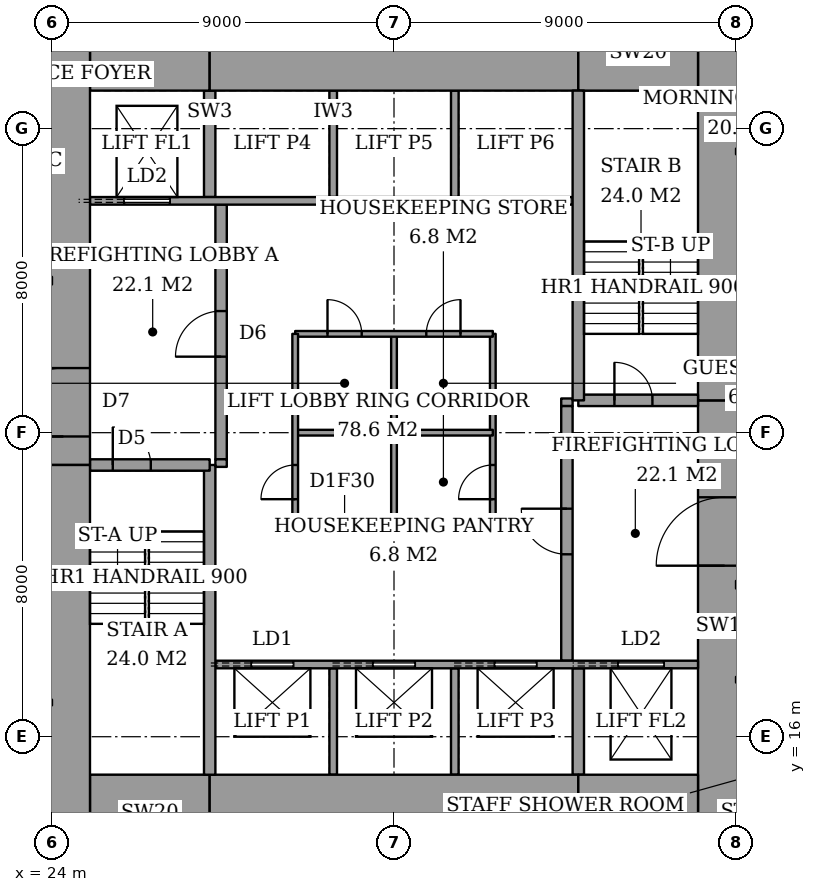
"""IFC4 building model, lengths in metres.
Left out: names, types, materials, properties, quantities, classifications, styles, units other than length and angle.
Written with IfcOpenShell. Run it as: python <this file> out.ifc"""

import sys

from ifc_helpers import new_model, si_unit, direction, frame, frame_2d, origin, place, context, subcontext, project, spatial, rectangle, extrude, element, fill, save


model = new_model("IFC4")
c1 = context("Model", 3, precision=1e-05, world=origin(), true_north=direction((0.0, 1.0)))
c2 = subcontext(c1, "Body", "Model", "MODEL_VIEW")
j1 = project(units=[si_unit("LENGTHUNIT", "METRE"), si_unit("PLANEANGLEUNIT", "RADIAN")], contexts=[c1])
p1 = place(None, origin())
s1 = spatial("IfcSite", under=j1, at=p1, CompositionType="ELEMENT")
p2 = place(p1, origin())
s2 = spatial("IfcBuilding", under=s1, at=p2, CompositionType="ELEMENT")
p3 = place(p2, frame((0.0, 0.0, 168.2)))
s3 = spatial("IfcBuildingStorey", under=s2, at=p3, CompositionType="ELEMENT", Elevation=168.2)
p4 = place(p3, frame((25.0, 14.0, 0.0), z_axis=(0.0, 0.0, 1.0), x_axis=(1.0, 0.0, 0.0)))
e1 = element("IfcWall", 1, at=p4, inside=s3, PredefinedType="SHEAR", context=c2, shape_type="SweptSolid", body=[
    extrude(rectangle(XDim=3.15, YDim=2.0, at=frame_2d((1.575, 0.0))), origin(), (0.0, 0.0, 1.0), 3.6),
])
p5 = place(p3, frame((28.15, 14.0, 0.0), z_axis=(0.0, 0.0, 1.0), x_axis=(1.0, 0.0, 0.0)))
e2 = element("IfcWall", 2, at=p5, inside=s3, PredefinedType="SHEAR", context=c2, shape_type="SweptSolid", body=[
    extrude(rectangle(XDim=9.7, YDim=2.0, at=frame_2d((4.85, 0.0))), origin(), (0.0, 0.0, 1.0), 3.6),
])
for number, where, z_axis, x_axis in (
    (3, (37.85, 14.0, 0.0), (0.0, 0.0, 1.0), (1.0, 0.0, 0.0)),
    (4, (25.0, 34.0, 0.0), (0.0, 0.0, 1.0), (1.0, 0.0, 0.0)),
):
    element("IfcWall", number, at=place(p3, frame(where, z_axis=z_axis, x_axis=x_axis)), inside=s3, PredefinedType="SHEAR", context=c2, shape_type="SweptSolid", body=[
        extrude(rectangle(XDim=3.15, YDim=2.0, at=frame_2d((1.575, 0.0))), origin(), (0.0, 0.0, 1.0), 3.6),
    ])
p6 = place(p3, frame((28.15, 34.0, 0.0), z_axis=(0.0, 0.0, 1.0), x_axis=(1.0, 0.0, 0.0)))
e5 = element("IfcWall", 5, at=p6, inside=s3, PredefinedType="SHEAR", context=c2, shape_type="SweptSolid", body=[
    extrude(rectangle(XDim=9.7, YDim=2.0, at=frame_2d((4.85, 0.0))), origin(), (0.0, 0.0, 1.0), 3.6),
])
p7 = place(p3, frame((37.85, 34.0, 0.0), z_axis=(0.0, 0.0, 1.0), x_axis=(1.0, 0.0, 0.0)))
e6 = element("IfcWall", 6, at=p7, inside=s3, PredefinedType="SHEAR", context=c2, shape_type="SweptSolid", body=[
    extrude(rectangle(XDim=3.15, YDim=2.0, at=frame_2d((1.575, 0.0))), origin(), (0.0, 0.0, 1.0), 3.6),
])
p8 = place(p3, frame((24.3, 13.0, 0.0), z_axis=(0.0, 0.0, 1.0), x_axis=(0.0, 1.0, 0.0)))
e7 = element("IfcWall", 7, at=p8, inside=s3, PredefinedType="SHEAR", context=c2, shape_type="SweptSolid", body=[
    extrude(rectangle(XDim=10.15, YDim=1.4, at=frame_2d((5.075, 0.0))), origin(), (0.0, 0.0, 1.0), 3.6),
])
p9 = place(p3, frame((24.3, 23.15, 0.0), z_axis=(0.0, 0.0, 1.0), x_axis=(0.0, 1.0, 0.0)))
e8 = element("IfcWall", 8, at=p9, inside=s3, PredefinedType="SHEAR", context=c2, shape_type="SweptSolid", body=[
    extrude(rectangle(XDim=11.85, YDim=1.4, at=frame_2d((5.925, 0.0))), origin(), (0.0, 0.0, 1.0), 3.6),
])
p10 = place(p9, frame((0.75, 0.0, 0.0)))
e9 = element("IfcOpeningElement", 9, at=p10, cuts=e8, PredefinedType="OPENING", context=c2, shape_type="SweptSolid", body=[
    extrude(rectangle(XDim=1.8, YDim=2.4, at=frame_2d((0.9, 1.2))), frame((0.0, 0.71, 0.0), z_axis=(0.0, -1.0, 0.0), x_axis=(1.0, 0.0, 0.0)), (0.0, 0.0, 1.0), 1.42),
])
p11 = place(p3, frame((41.7, 13.0, 0.0), z_axis=(0.0, 0.0, 1.0), x_axis=(0.0, 1.0, 0.0)))
e10 = element("IfcWall", 10, at=p11, inside=s3, PredefinedType="SHEAR", context=c2, shape_type="SweptSolid", body=[
    extrude(rectangle(XDim=11.85, YDim=1.4, at=frame_2d((5.925, 0.0))), origin(), (0.0, 0.0, 1.0), 3.6),
])
p12 = place(p11, frame((7.5, 0.0, 0.0)))
e11 = element("IfcOpeningElement", 11, at=p12, cuts=e10, PredefinedType="OPENING", context=c2, shape_type="SweptSolid", body=[
    extrude(rectangle(XDim=1.8, YDim=2.4, at=frame_2d((0.9, 1.2))), frame((0.0, 0.71, 0.0), z_axis=(0.0, -1.0, 0.0), x_axis=(1.0, 0.0, 0.0)), (0.0, 0.0, 1.0), 1.42),
])
p13 = place(p3, frame((41.7, 24.85, 0.0), z_axis=(0.0, 0.0, 1.0), x_axis=(0.0, 1.0, 0.0)))
e12 = element("IfcWall", 12, at=p13, inside=s3, PredefinedType="SHEAR", context=c2, shape_type="SweptSolid", body=[
    extrude(rectangle(XDim=10.15, YDim=1.4, at=frame_2d((5.075, 0.0))), origin(), (0.0, 0.0, 1.0), 3.6),
])
p14 = place(p3, frame((28.15, 15.0, 0.0), z_axis=(0.0, 0.0, 1.0), x_axis=(0.0, 1.0, 0.0)))
e13 = element("IfcWall", 13, at=p14, inside=s3, PredefinedType="SHEAR", context=c2, shape_type="SweptSolid", body=[
    extrude(rectangle(XDim=8.15, YDim=0.3, at=frame_2d((4.075, 0.0))), origin(), (0.0, 0.0, 1.0), 3.6),
])
p15 = place(p3, frame((25.0, 23.15, 0.0), z_axis=(0.0, 0.0, 1.0), x_axis=(1.0, 0.0, 0.0)))
e14 = element("IfcWall", 14, at=p15, inside=s3, PredefinedType="SHEAR", context=c2, shape_type="SweptSolid", body=[
    extrude(rectangle(XDim=3.15, YDim=0.3, at=frame_2d((1.575, 0.0))), origin(), (0.0, 0.0, 1.0), 3.6),
])
p16 = place(p15, frame((0.6, 0.0, 0.0)))
e15 = element("IfcOpeningElement", 15, at=p16, cuts=e14, PredefinedType="OPENING", context=c2, shape_type="SweptSolid", body=[
    extrude(rectangle(XDim=1.0, YDim=2.1, at=frame_2d((0.5, 1.05))), frame((0.0, 0.16, 0.0), z_axis=(0.0, -1.0, 0.0), x_axis=(1.0, 0.0, 0.0)), (0.0, 0.0, 1.0), 0.32),
])
p17 = place(p3, frame((37.85, 24.85, 0.0), z_axis=(0.0, 0.0, 1.0), x_axis=(0.0, 1.0, 0.0)))
e16 = element("IfcWall", 16, at=p17, inside=s3, PredefinedType="SHEAR", context=c2, shape_type="SweptSolid", body=[
    extrude(rectangle(XDim=8.15, YDim=0.3, at=frame_2d((4.075, 0.0))), origin(), (0.0, 0.0, 1.0), 3.6),
])
p18 = place(p3, frame((37.85, 24.85, 0.0), z_axis=(0.0, 0.0, 1.0), x_axis=(1.0, 0.0, 0.0)))
e17 = element("IfcWall", 17, at=p18, inside=s3, PredefinedType="SHEAR", context=c2, shape_type="SweptSolid", body=[
    extrude(rectangle(XDim=3.15, YDim=0.3, at=frame_2d((1.575, 0.0))), origin(), (0.0, 0.0, 1.0), 3.6),
])
p19 = place(p18, frame((0.95, 0.0, 0.0)))
e18 = element("IfcOpeningElement", 18, at=p19, cuts=e17, PredefinedType="OPENING", context=c2, shape_type="SweptSolid", body=[
    extrude(rectangle(XDim=1.0, YDim=2.1, at=frame_2d((0.5, 1.05))), frame((0.0, 0.16, 0.0), z_axis=(0.0, -1.0, 0.0), x_axis=(1.0, 0.0, 0.0)), (0.0, 0.0, 1.0), 0.32),
])
p20 = place(p3, frame((28.45, 23.3, 0.0), z_axis=(0.0, 0.0, 1.0), x_axis=(0.0, 1.0, 0.0)))
e19 = element("IfcWall", 19, at=p20, inside=s3, PredefinedType="PARTITIONING", context=c2, shape_type="SweptSolid", body=[
    extrude(rectangle(XDim=6.7, YDim=0.3, at=frame_2d((3.35, 0.0))), origin(), (0.0, 0.0, 1.0), 3.6),
])
p21 = place(p20, frame((2.7, 0.0, 0.0)))
e20 = element("IfcOpeningElement", 20, at=p21, cuts=e19, PredefinedType="OPENING", context=c2, shape_type="SweptSolid", body=[
    extrude(rectangle(XDim=1.2, YDim=2.1, at=frame_2d((0.6, 1.05))), frame((0.0, 0.16, 0.0), z_axis=(0.0, -1.0, 0.0), x_axis=(1.0, 0.0, 0.0)), (0.0, 0.0, 1.0), 0.32),
])
p22 = place(p3, frame((37.55, 18.0, 0.0), z_axis=(0.0, 0.0, 1.0), x_axis=(0.0, 1.0, 0.0)))
e21 = element("IfcWall", 21, at=p22, inside=s3, PredefinedType="PARTITIONING", context=c2, shape_type="SweptSolid", body=[
    extrude(rectangle(XDim=6.7, YDim=0.3, at=frame_2d((3.35, 0.0))), origin(), (0.0, 0.0, 1.0), 3.6),
])
p23 = place(p22, frame((2.8, 0.0, 0.0)))
e22 = element("IfcOpeningElement", 22, at=p23, cuts=e21, PredefinedType="OPENING", context=c2, shape_type="SweptSolid", body=[
    extrude(rectangle(XDim=1.2, YDim=2.1, at=frame_2d((0.6, 1.05))), frame((0.0, 0.16, 0.0), z_axis=(0.0, -1.0, 0.0), x_axis=(1.0, 0.0, 0.0)), (0.0, 0.0, 1.0), 0.32),
])
p24 = place(p3, frame((28.3, 17.9, 0.0), z_axis=(0.0, 0.0, 1.0), x_axis=(1.0, 0.0, 0.0)))
e23 = element("IfcWall", 23, at=p24, inside=s3, PredefinedType="PARTITIONING", context=c2, shape_type="SweptSolid", body=[
    extrude(rectangle(XDim=12.7, YDim=0.2, at=frame_2d((6.35, 0.0))), origin(), (0.0, 0.0, 1.0), 3.6),
])
p25 = place(p24, frame((0.95, 0.0, 0.0)))
e24 = element("IfcOpeningElement", 24, at=p25, cuts=e23, PredefinedType="OPENING", context=c2, shape_type="SweptSolid", body=[
    extrude(rectangle(XDim=1.1, YDim=2.1, at=frame_2d((0.55, 1.05))), frame((0.0, 0.11, 0.0), z_axis=(0.0, -1.0, 0.0), x_axis=(1.0, 0.0, 0.0)), (0.0, 0.0, 1.0), 0.22),
])
p26 = place(p24, frame((4.15, 0.0, 0.0)))
e25 = element("IfcOpeningElement", 25, at=p26, cuts=e23, PredefinedType="OPENING", context=c2, shape_type="SweptSolid", body=[
    extrude(rectangle(XDim=1.1, YDim=2.1, at=frame_2d((0.55, 1.05))), frame((0.0, 0.11, 0.0), z_axis=(0.0, -1.0, 0.0), x_axis=(1.0, 0.0, 0.0)), (0.0, 0.0, 1.0), 0.22),
])
p27 = place(p24, frame((7.35, 0.0, 0.0)))
e26 = element("IfcOpeningElement", 26, at=p27, cuts=e23, PredefinedType="OPENING", context=c2, shape_type="SweptSolid", body=[
    extrude(rectangle(XDim=1.1, YDim=2.1, at=frame_2d((0.55, 1.05))), frame((0.0, 0.11, 0.0), z_axis=(0.0, -1.0, 0.0), x_axis=(1.0, 0.0, 0.0)), (0.0, 0.0, 1.0), 0.22),
])
p28 = place(p24, frame((10.6, 0.0, 0.0)))
e27 = element("IfcOpeningElement", 27, at=p28, cuts=e23, PredefinedType="OPENING", context=c2, shape_type="SweptSolid", body=[
    extrude(rectangle(XDim=1.2, YDim=2.1, at=frame_2d((0.6, 1.05))), frame((0.0, 0.11, 0.0), z_axis=(0.0, -1.0, 0.0), x_axis=(1.0, 0.0, 0.0)), (0.0, 0.0, 1.0), 0.22),
])
p29 = place(p3, frame((25.0, 30.1, 0.0), z_axis=(0.0, 0.0, 1.0), x_axis=(1.0, 0.0, 0.0)))
e28 = element("IfcWall", 28, at=p29, inside=s3, PredefinedType="PARTITIONING", context=c2, shape_type="SweptSolid", body=[
    extrude(rectangle(XDim=12.7, YDim=0.2, at=frame_2d((6.35, 0.0))), origin(), (0.0, 0.0, 1.0), 3.6),
])
p30 = place(p29, frame((0.9, 0.0, 0.0)))
e29 = element("IfcOpeningElement", 29, at=p30, cuts=e28, PredefinedType="OPENING", context=c2, shape_type="SweptSolid", body=[
    extrude(rectangle(XDim=1.2, YDim=2.1, at=frame_2d((0.6, 1.05))), frame((0.0, 0.11, 0.0), z_axis=(0.0, -1.0, 0.0), x_axis=(1.0, 0.0, 0.0)), (0.0, 0.0, 1.0), 0.22),
])
for number, where, z_axis, x_axis in (
    (30, (31.4, 15.0, 0.0), (0.0, 0.0, 1.0), (0.0, 1.0, 0.0)),
    (31, (34.6, 15.0, 0.0), (0.0, 0.0, 1.0), (0.0, 1.0, 0.0)),
):
    element("IfcWall", number, at=place(p3, frame(where, z_axis=z_axis, x_axis=x_axis)), inside=s3, PredefinedType="PARTITIONING", context=c2, shape_type="SweptSolid", body=[
        extrude(rectangle(XDim=2.8, YDim=0.2, at=frame_2d((1.4, 0.0))), origin(), (0.0, 0.0, 1.0), 3.6),
    ])
p31 = place(p3, frame((37.85, 15.0, 0.0), z_axis=(0.0, 0.0, 1.0), x_axis=(0.0, 1.0, 0.0)))
e32 = element("IfcWall", 32, at=p31, inside=s3, PredefinedType="SHEAR", context=c2, shape_type="SweptSolid", body=[
    extrude(rectangle(XDim=2.8, YDim=0.3, at=frame_2d((1.4, 0.0))), origin(), (0.0, 0.0, 1.0), 3.6),
])
for number, where, z_axis, x_axis in (
    (33, (31.4, 30.2, 0.0), (0.0, 0.0, 1.0), (0.0, 1.0, 0.0)),
    (34, (34.6, 30.2, 0.0), (0.0, 0.0, 1.0), (0.0, 1.0, 0.0)),
):
    element("IfcWall", number, at=place(p3, frame(where, z_axis=z_axis, x_axis=x_axis)), inside=s3, PredefinedType="PARTITIONING", context=c2, shape_type="SweptSolid", body=[
        extrude(rectangle(XDim=2.8, YDim=0.2, at=frame_2d((1.4, 0.0))), origin(), (0.0, 0.0, 1.0), 3.6),
    ])
p32 = place(p3, frame((28.15, 30.2, 0.0), z_axis=(0.0, 0.0, 1.0), x_axis=(0.0, 1.0, 0.0)))
e35 = element("IfcWall", 35, at=p32, inside=s3, PredefinedType="SHEAR", context=c2, shape_type="SweptSolid", body=[
    extrude(rectangle(XDim=2.8, YDim=0.3, at=frame_2d((1.4, 0.0))), origin(), (0.0, 0.0, 1.0), 3.6),
])
for number, where, z_axis, x_axis in (
    (36, (28.3, 23.2, 0.0), (0.0, 0.0, 1.0), (1.0, 0.0, 0.0)),
    (37, (37.4, 24.8, 0.0), (0.0, 0.0, 1.0), (1.0, 0.0, 0.0)),
):
    element("IfcWall", number, at=place(p3, frame(where, z_axis=z_axis, x_axis=x_axis)), inside=s3, PredefinedType="PARTITIONING", context=c2, shape_type="SweptSolid", body=[
        extrude(rectangle(XDim=0.3, YDim=0.2, at=frame_2d((0.15, 0.0))), origin(), (0.0, 0.0, 1.0), 3.6),
    ])
p33 = place(p3, frame((30.4, 21.4, 0.0), z_axis=(0.0, 0.0, 1.0), x_axis=(1.0, 0.0, 0.0)))
e38 = element("IfcWall", 38, at=p33, inside=s3, PredefinedType="PARTITIONING", context=c2, shape_type="SweptSolid", body=[
    extrude(rectangle(XDim=5.2, YDim=0.15, at=frame_2d((2.6, 0.0))), origin(), (0.0, 0.0, 1.0), 3.25),
])
p34 = place(p3, frame((30.4, 26.6, 0.0), z_axis=(0.0, 0.0, 1.0), x_axis=(1.0, 0.0, 0.0)))
e39 = element("IfcWall", 39, at=p34, inside=s3, PredefinedType="PARTITIONING", context=c2, shape_type="SweptSolid", body=[
    extrude(rectangle(XDim=5.2, YDim=0.15, at=frame_2d((2.6, 0.0))), origin(), (0.0, 0.0, 1.0), 3.25),
])
p35 = place(p34, frame((0.85, 0.0, 0.0)))
e40 = element("IfcOpeningElement", 40, at=p35, cuts=e39, PredefinedType="OPENING", context=c2, shape_type="SweptSolid", body=[
    extrude(rectangle(XDim=0.9, YDim=2.1, at=frame_2d((0.45, 1.05))), frame((0.0, 0.085, 0.0), z_axis=(0.0, -1.0, 0.0), x_axis=(1.0, 0.0, 0.0)), (0.0, 0.0, 1.0), 0.17),
])
p36 = place(p34, frame((3.45, 0.0, 0.0)))
e41 = element("IfcOpeningElement", 41, at=p36, cuts=e39, PredefinedType="OPENING", context=c2, shape_type="SweptSolid", body=[
    extrude(rectangle(XDim=0.9, YDim=2.1, at=frame_2d((0.45, 1.05))), frame((0.0, 0.085, 0.0), z_axis=(0.0, -1.0, 0.0), x_axis=(1.0, 0.0, 0.0)), (0.0, 0.0, 1.0), 0.17),
])
p37 = place(p3, frame((30.4, 21.4, 0.0), z_axis=(0.0, 0.0, 1.0), x_axis=(0.0, 1.0, 0.0)))
e42 = element("IfcWall", 42, at=p37, inside=s3, PredefinedType="PARTITIONING", context=c2, shape_type="SweptSolid", body=[
    extrude(rectangle(XDim=5.2, YDim=0.15, at=frame_2d((2.6, 0.0))), origin(), (0.0, 0.0, 1.0), 3.25),
])
p38 = place(p37, frame((0.85, 0.0, 0.0)))
e43 = element("IfcOpeningElement", 43, at=p38, cuts=e42, PredefinedType="OPENING", context=c2, shape_type="SweptSolid", body=[
    extrude(rectangle(XDim=0.9, YDim=2.1, at=frame_2d((0.45, 1.05))), frame((0.0, 0.085, 0.0), z_axis=(0.0, -1.0, 0.0), x_axis=(1.0, 0.0, 0.0)), (0.0, 0.0, 1.0), 0.17),
])
p39 = place(p3, frame((35.6, 21.4, 0.0), z_axis=(0.0, 0.0, 1.0), x_axis=(0.0, 1.0, 0.0)))
e44 = element("IfcWall", 44, at=p39, inside=s3, PredefinedType="PARTITIONING", context=c2, shape_type="SweptSolid", body=[
    extrude(rectangle(XDim=5.2, YDim=0.15, at=frame_2d((2.6, 0.0))), origin(), (0.0, 0.0, 1.0), 3.25),
])
p40 = place(p39, frame((0.85, 0.0, 0.0)))
e45 = element("IfcOpeningElement", 45, at=p40, cuts=e44, PredefinedType="OPENING", context=c2, shape_type="SweptSolid", body=[
    extrude(rectangle(XDim=0.9, YDim=2.1, at=frame_2d((0.45, 1.05))), frame((0.0, 0.085, 0.0), z_axis=(0.0, -1.0, 0.0), x_axis=(1.0, 0.0, 0.0)), (0.0, 0.0, 1.0), 0.17),
])
for number, where, z_axis, x_axis in (
    (46, (30.4, 24.0, 0.0), (0.0, 0.0, 1.0), (1.0, 0.0, 0.0)),
    (47, (33.0, 21.4, 0.0), (0.0, 0.0, 1.0), (0.0, 1.0, 0.0)),
):
    element("IfcWall", number, at=place(p3, frame(where, z_axis=z_axis, x_axis=x_axis)), inside=s3, PredefinedType="PARTITIONING", context=c2, shape_type="SweptSolid", body=[
        extrude(rectangle(XDim=5.2, YDim=0.15, at=frame_2d((2.6, 0.0))), origin(), (0.0, 0.0, 1.0), 3.25),
    ])
p41 = place(p16, origin())
e48 = element("IfcDoor", 48, at=p41, inside=s3, OperationType="SINGLE_SWING_RIGHT", PredefinedType="DOOR", context=c2, shape_type="SweptSolid", body=[
    extrude(rectangle(XDim=1.0, YDim=2.1, at=frame_2d((0.5, 1.05))), frame((0.0, 0.025, 0.0), z_axis=(0.0, -1.0, 0.0), x_axis=(1.0, 0.0, 0.0)), (0.0, 0.0, 1.0), 0.05),
])
fill(e15, e48)
p42 = place(p19, origin())
e49 = element("IfcDoor", 49, at=p42, inside=s3, OperationType="SINGLE_SWING_RIGHT", PredefinedType="DOOR", context=c2, shape_type="SweptSolid", body=[
    extrude(rectangle(XDim=1.0, YDim=2.1, at=frame_2d((0.5, 1.05))), frame((0.0, 0.025, 0.0), z_axis=(0.0, -1.0, 0.0), x_axis=(1.0, 0.0, 0.0)), (0.0, 0.0, 1.0), 0.05),
])
fill(e18, e49)
p43 = place(p21, origin())
e50 = element("IfcDoor", 50, at=p43, inside=s3, OperationType="SINGLE_SWING_RIGHT", PredefinedType="DOOR", context=c2, shape_type="SweptSolid", body=[
    extrude(rectangle(XDim=1.2, YDim=2.1, at=frame_2d((0.6, 1.05))), frame((0.0, 0.025, 0.0), z_axis=(0.0, -1.0, 0.0), x_axis=(1.0, 0.0, 0.0)), (0.0, 0.0, 1.0), 0.05),
])
fill(e20, e50)
p44 = place(p23, origin())
e51 = element("IfcDoor", 51, at=p44, inside=s3, OperationType="SINGLE_SWING_LEFT", PredefinedType="DOOR", context=c2, shape_type="SweptSolid", body=[
    extrude(rectangle(XDim=1.2, YDim=2.1, at=frame_2d((0.6, 1.05))), frame((0.0, 0.025, 0.0), z_axis=(0.0, -1.0, 0.0), x_axis=(1.0, 0.0, 0.0)), (0.0, 0.0, 1.0), 0.05),
])
fill(e22, e51)
p45 = place(p10, origin())
e52 = element("IfcDoor", 52, at=p45, inside=s3, OperationType="DOUBLE_DOOR_DOUBLE_SWING", PredefinedType="DOOR", context=c2, shape_type="SweptSolid", body=[
    extrude(rectangle(XDim=1.8, YDim=2.4, at=frame_2d((0.9, 1.2))), frame((0.0, 0.025, 0.0), z_axis=(0.0, -1.0, 0.0), x_axis=(1.0, 0.0, 0.0)), (0.0, 0.0, 1.0), 0.05),
])
fill(e9, e52)
p46 = place(p12, origin())
e53 = element("IfcDoor", 53, at=p46, inside=s3, OperationType="DOUBLE_DOOR_DOUBLE_SWING", PredefinedType="DOOR", context=c2, shape_type="SweptSolid", body=[
    extrude(rectangle(XDim=1.8, YDim=2.4, at=frame_2d((0.9, 1.2))), frame((0.0, 0.025, 0.0), z_axis=(0.0, -1.0, 0.0), x_axis=(1.0, 0.0, 0.0)), (0.0, 0.0, 1.0), 0.05),
])
fill(e11, e53)
p47 = place(p38, origin())
e54 = element("IfcDoor", 54, at=p47, inside=s3, OperationType="SINGLE_SWING_RIGHT", PredefinedType="DOOR", context=c2, shape_type="SweptSolid", body=[
    extrude(rectangle(XDim=0.9, YDim=2.1, at=frame_2d((0.45, 1.05))), frame((0.0, 0.025, 0.0), z_axis=(0.0, -1.0, 0.0), x_axis=(1.0, 0.0, 0.0)), (0.0, 0.0, 1.0), 0.05),
])
fill(e43, e54)
p48 = place(p40, origin())
e55 = element("IfcDoor", 55, at=p48, inside=s3, OperationType="SINGLE_SWING_RIGHT", PredefinedType="DOOR", context=c2, shape_type="SweptSolid", body=[
    extrude(rectangle(XDim=0.9, YDim=2.1, at=frame_2d((0.45, 1.05))), frame((0.0, 0.025, 0.0), z_axis=(0.0, -1.0, 0.0), x_axis=(1.0, 0.0, 0.0)), (0.0, 0.0, 1.0), 0.05),
])
fill(e45, e55)
p49 = place(p35, origin())
e56 = element("IfcDoor", 56, at=p49, inside=s3, OperationType="SINGLE_SWING_RIGHT", PredefinedType="DOOR", context=c2, shape_type="SweptSolid", body=[
    extrude(rectangle(XDim=0.9, YDim=2.1, at=frame_2d((0.45, 1.05))), frame((0.0, 0.025, 0.0), z_axis=(0.0, -1.0, 0.0), x_axis=(1.0, 0.0, 0.0)), (0.0, 0.0, 1.0), 0.05),
])
fill(e40, e56)
p50 = place(p36, origin())
e57 = element("IfcDoor", 57, at=p50, inside=s3, OperationType="SINGLE_SWING_LEFT", PredefinedType="DOOR", context=c2, shape_type="SweptSolid", body=[
    extrude(rectangle(XDim=0.9, YDim=2.1, at=frame_2d((0.45, 1.05))), frame((0.0, 0.025, 0.0), z_axis=(0.0, -1.0, 0.0), x_axis=(1.0, 0.0, 0.0)), (0.0, 0.0, 1.0), 0.05),
])
fill(e41, e57)
p51 = place(p25, origin())
e58 = element("IfcDoor", 58, at=p51, inside=s3, OperationType="SLIDING_TO_LEFT", PredefinedType="DOOR", context=c2, shape_type="SweptSolid", body=[
    extrude(rectangle(XDim=1.1, YDim=2.1, at=frame_2d((0.55, 1.05))), frame((0.0, 0.025, 0.0), z_axis=(0.0, -1.0, 0.0), x_axis=(1.0, 0.0, 0.0)), (0.0, 0.0, 1.0), 0.05),
])
fill(e24, e58)
p52 = place(p26, origin())
e59 = element("IfcDoor", 59, at=p52, inside=s3, OperationType="SLIDING_TO_LEFT", PredefinedType="DOOR", context=c2, shape_type="SweptSolid", body=[
    extrude(rectangle(XDim=1.1, YDim=2.1, at=frame_2d((0.55, 1.05))), frame((0.0, 0.025, 0.0), z_axis=(0.0, -1.0, 0.0), x_axis=(1.0, 0.0, 0.0)), (0.0, 0.0, 1.0), 0.05),
])
fill(e25, e59)
p53 = place(p27, origin())
e60 = element("IfcDoor", 60, at=p53, inside=s3, OperationType="SLIDING_TO_LEFT", PredefinedType="DOOR", context=c2, shape_type="SweptSolid", body=[
    extrude(rectangle(XDim=1.1, YDim=2.1, at=frame_2d((0.55, 1.05))), frame((0.0, 0.025, 0.0), z_axis=(0.0, -1.0, 0.0), x_axis=(1.0, 0.0, 0.0)), (0.0, 0.0, 1.0), 0.05),
])
fill(e26, e60)
p54 = place(p30, origin())
e61 = element("IfcDoor", 61, at=p54, inside=s3, OperationType="SLIDING_TO_LEFT", PredefinedType="DOOR", context=c2, shape_type="SweptSolid", body=[
    extrude(rectangle(XDim=1.2, YDim=2.1, at=frame_2d((0.6, 1.05))), frame((0.0, 0.025, 0.0), z_axis=(0.0, -1.0, 0.0), x_axis=(1.0, 0.0, 0.0)), (0.0, 0.0, 1.0), 0.05),
])
fill(e29, e61)
p55 = place(p28, origin())
e62 = element("IfcDoor", 62, at=p55, inside=s3, OperationType="SLIDING_TO_LEFT", PredefinedType="DOOR", context=c2, shape_type="SweptSolid", body=[
    extrude(rectangle(XDim=1.2, YDim=2.1, at=frame_2d((0.6, 1.05))), frame((0.0, 0.025, 0.0), z_axis=(0.0, -1.0, 0.0), x_axis=(1.0, 0.0, 0.0)), (0.0, 0.0, 1.0), 0.05),
])
fill(e27, e62)
save(model, sys.argv[1])
